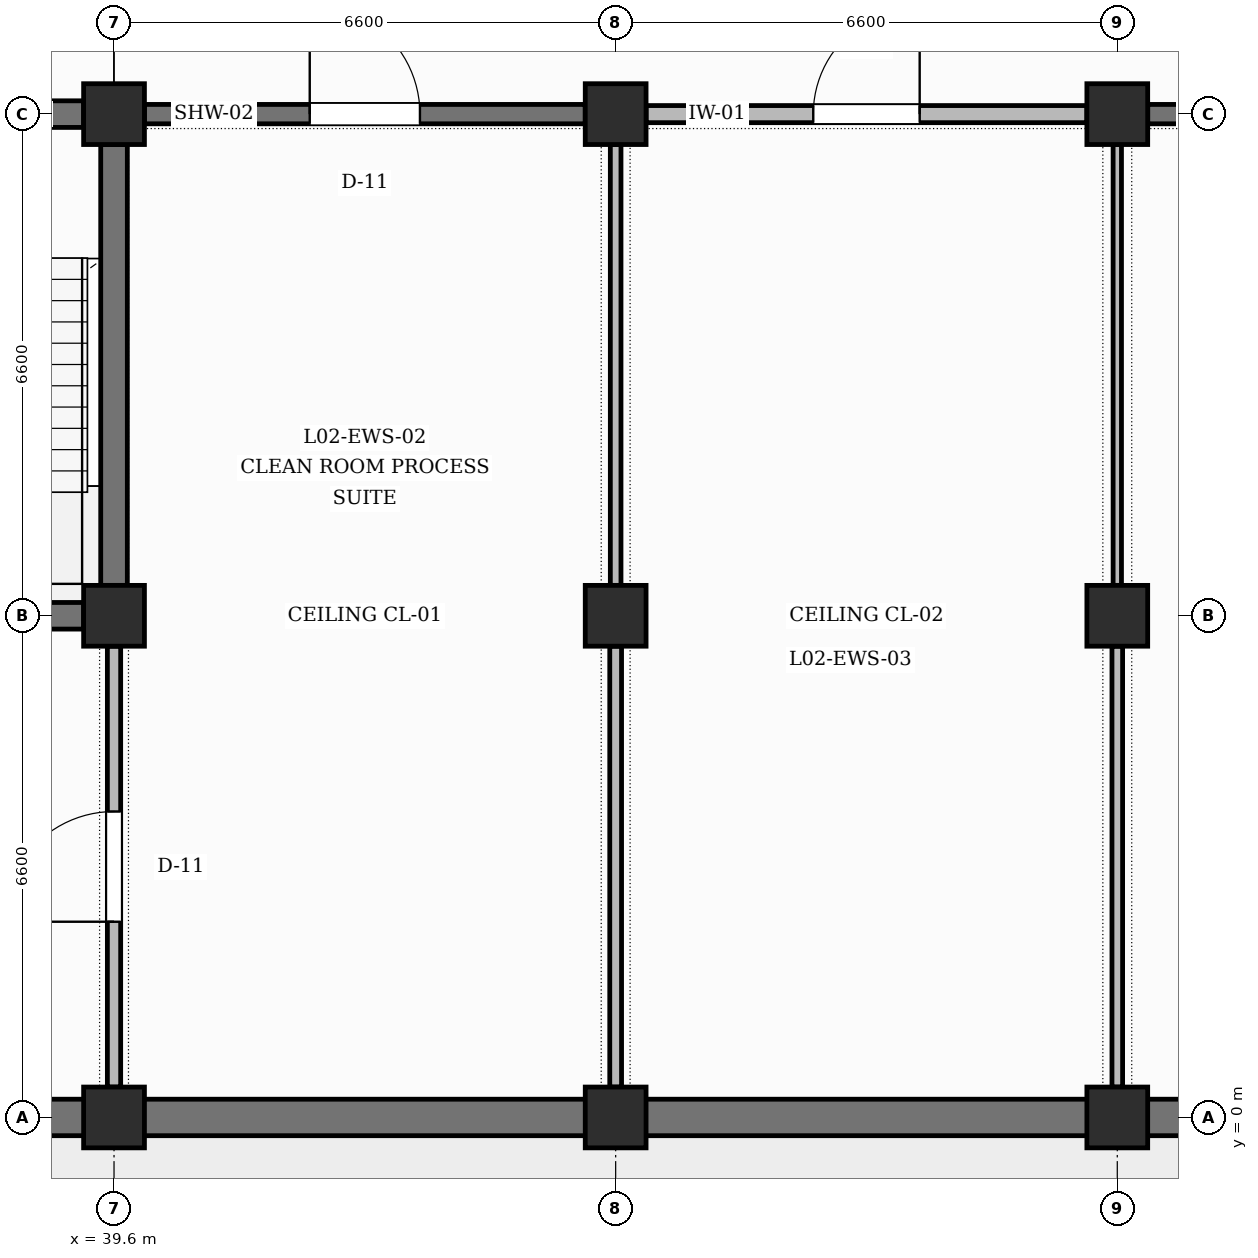
"""IFC4 building model, lengths in metres.
Left out: names, types, materials, properties, quantities, classifications, styles, units other than length and angle.
Written with IfcOpenShell. Run it as: python <this file> out.ifc"""

import sys

from ifc_helpers import new_model, si_unit, direction, frame, frame_2d, origin, origin_2d, place, context, subcontext, project, spatial, rectangle, extrude, element, fill, save


model = new_model("IFC4")
c1 = context("Model", 3, precision=1e-05, world=origin(), true_north=direction((0.0, 1.0)))
c2 = subcontext(c1, "Body", "Model", "MODEL_VIEW")
j1 = project(units=[si_unit("LENGTHUNIT", "METRE"), si_unit("PLANEANGLEUNIT", "RADIAN")], contexts=[c1])
p1 = place(None, origin())
s1 = spatial("IfcSite", under=j1, at=p1, CompositionType="ELEMENT")
p2 = place(p1, origin())
s2 = spatial("IfcBuilding", under=s1, at=p2, CompositionType="ELEMENT")
p3 = place(p2, frame((0.0, 0.0, 10.2)))
s3 = spatial("IfcBuildingStorey", under=s2, at=p3, CompositionType="ELEMENT", Elevation=10.2)
for number, where, z_axis, x_axis in (
    (1, (39.6, 0.0, 0.0), (0.0, 0.0, 1.0), (1.0, 0.0, 0.0)),
    (2, (39.6, 6.6, 0.0), (0.0, 0.0, 1.0), (1.0, 0.0, 0.0)),
    (3, (39.6, 13.2, 0.0), (0.0, 0.0, 1.0), (1.0, 0.0, 0.0)),
    (4, (46.2, 0.0, 0.0), (0.0, 0.0, 1.0), (1.0, 0.0, 0.0)),
    (5, (46.2, 6.6, 0.0), (0.0, 0.0, 1.0), (1.0, 0.0, 0.0)),
    (6, (46.2, 13.2, 0.0), (0.0, 0.0, 1.0), (1.0, 0.0, 0.0)),
    (7, (52.8, 0.0, 0.0), (0.0, 0.0, 1.0), (1.0, 0.0, 0.0)),
    (8, (52.8, 6.6, 0.0), (0.0, 0.0, 1.0), (1.0, 0.0, 0.0)),
    (9, (52.8, 13.2, 0.0), (0.0, 0.0, 1.0), (1.0, 0.0, 0.0)),
):
    element("IfcColumn", number, at=place(p3, frame(where, z_axis=z_axis, x_axis=x_axis)), inside=s3, PredefinedType="COLUMN", context=c2, shape_type="SweptSolid", body=[
        extrude(rectangle(XDim=0.8, YDim=0.8, at=origin_2d()), origin(), (0.0, 0.0, 1.0), 4.2),
    ])
p4 = place(p3, frame((33.425, 0.0, 0.0), z_axis=(0.0, 0.0, 1.0), x_axis=(1.0, 0.0, 0.0)))
e10 = element("IfcWall", 10, at=p4, inside=s3, PredefinedType="SOLIDWALL", context=c2, shape_type="SweptSolid", body=[
    extrude(rectangle(XDim=5.775, YDim=0.48, at=frame_2d((2.887, 0.0))), origin(), (0.0, 0.0, 1.0), 3.25),
])
p5 = place(p3, frame((40.0, 0.0, 0.0), z_axis=(0.0, 0.0, 1.0), x_axis=(1.0, 0.0, 0.0)))
e11 = element("IfcWall", 11, at=p5, inside=s3, PredefinedType="SOLIDWALL", context=c2, shape_type="SweptSolid", body=[
    extrude(rectangle(XDim=5.8, YDim=0.48, at=frame_2d((2.9, 0.0))), origin(), (0.0, 0.0, 1.0), 3.25),
])
p6 = place(p3, frame((46.6, 0.0, 0.0), z_axis=(0.0, 0.0, 1.0), x_axis=(1.0, 0.0, 0.0)))
e12 = element("IfcWall", 12, at=p6, inside=s3, PredefinedType="SOLIDWALL", context=c2, shape_type="SweptSolid", body=[
    extrude(rectangle(XDim=5.8, YDim=0.48, at=frame_2d((2.9, 0.0))), origin(), (0.0, 0.0, 1.0), 3.25),
])
p7 = place(p3, frame((53.2, 0.0, 0.0), z_axis=(0.0, 0.0, 1.0), x_axis=(1.0, 0.0, 0.0)))
e13 = element("IfcWall", 13, at=p7, inside=s3, PredefinedType="SOLIDWALL", context=c2, shape_type="SweptSolid", body=[
    extrude(rectangle(XDim=5.8, YDim=0.48, at=frame_2d((2.9, 0.0))), origin(), (0.0, 0.0, 1.0), 3.25),
])
p8 = place(p3, frame((33.425, 6.6, 0.0), z_axis=(0.0, 0.0, 1.0), x_axis=(1.0, 0.0, 0.0)))
e14 = element("IfcWall", 14, at=p8, inside=s3, PredefinedType="SHEAR", context=c2, shape_type="SweptSolid", body=[
    extrude(rectangle(XDim=5.775, YDim=0.35, at=frame_2d((2.887, 0.0))), origin(), (0.0, 0.0, 1.0), 3.0),
])
p9 = place(p3, frame((33.425, 13.2, 0.0), z_axis=(0.0, 0.0, 1.0), x_axis=(1.0, 0.0, 0.0)))
e15 = element("IfcWall", 15, at=p9, inside=s3, PredefinedType="SHEAR", context=c2, shape_type="SweptSolid", body=[
    extrude(rectangle(XDim=5.775, YDim=0.35, at=frame_2d((2.887, 0.0))), origin(), (0.0, 0.0, 1.0), 3.1),
])
p10 = place(p9, frame((2.312, 0.0, 0.0)))
e16 = element("IfcOpeningElement", 16, at=p10, cuts=e15, PredefinedType="OPENING", context=c2, shape_type="SweptSolid", body=[
    extrude(rectangle(XDim=1.15, YDim=2.2, at=frame_2d((0.575, 1.1))), frame((0.0, 0.185, 0.0), z_axis=(0.0, -1.0, 0.0), x_axis=(1.0, 0.0, 0.0)), (0.0, 0.0, 1.0), 0.37),
])
p11 = place(p3, frame((39.6, 7.0, 0.0), z_axis=(0.0, 0.0, 1.0), x_axis=(0.0, 1.0, 0.0)))
e17 = element("IfcWall", 17, at=p11, inside=s3, PredefinedType="SHEAR", context=c2, shape_type="SweptSolid", body=[
    extrude(rectangle(XDim=5.8, YDim=0.35, at=frame_2d((2.9, 0.0))), origin(), (0.0, 0.0, 1.0), 3.1),
])
p12 = place(p3, frame((39.6, 0.4, 0.0), z_axis=(0.0, 0.0, 1.0), x_axis=(0.0, 1.0, 0.0)))
e18 = element("IfcWall", 18, at=p12, inside=s3, PredefinedType="PARTITIONING", context=c2, shape_type="SweptSolid", body=[
    extrude(rectangle(XDim=5.8, YDim=0.175, at=frame_2d((2.9, 0.0))), origin(), (0.0, 0.0, 1.0), 3.1),
])
p13 = place(p12, frame((2.175, 0.0, 0.0)))
e19 = element("IfcOpeningElement", 19, at=p13, cuts=e18, PredefinedType="OPENING", context=c2, shape_type="SweptSolid", body=[
    extrude(rectangle(XDim=1.45, YDim=2.25, at=frame_2d((0.725, 1.125))), frame((0.0, 0.097, 0.0), z_axis=(0.0, -1.0, 0.0), x_axis=(1.0, 0.0, 0.0)), (0.0, 0.0, 1.0), 0.195),
])
p14 = place(p3, frame((46.2, 0.4, 0.0), z_axis=(0.0, 0.0, 1.0), x_axis=(0.0, 1.0, 0.0)))
e20 = element("IfcWall", 20, at=p14, inside=s3, PredefinedType="PARTITIONING", context=c2, shape_type="SweptSolid", body=[
    extrude(rectangle(XDim=5.8, YDim=0.155, at=frame_2d((2.9, 0.0))), origin(), (0.0, 0.0, 1.0), 3.1),
])
p15 = place(p3, frame((46.2, 7.0, 0.0), z_axis=(0.0, 0.0, 1.0), x_axis=(0.0, 1.0, 0.0)))
e21 = element("IfcWall", 21, at=p15, inside=s3, PredefinedType="PARTITIONING", context=c2, shape_type="SweptSolid", body=[
    extrude(rectangle(XDim=5.8, YDim=0.14, at=frame_2d((2.9, 0.0))), origin(), (0.0, 0.0, 1.0), 3.1),
])
p16 = place(p3, frame((40.0, 13.2, 0.0), z_axis=(0.0, 0.0, 1.0), x_axis=(1.0, 0.0, 0.0)))
e22 = element("IfcWall", 22, at=p16, inside=s3, PredefinedType="SHEAR", context=c2, shape_type="SweptSolid", body=[
    extrude(rectangle(XDim=5.8, YDim=0.255, at=frame_2d((2.9, 0.0))), origin(), (0.0, 0.0, 1.0), 3.0),
])
p17 = place(p16, frame((2.175, 0.0, 0.0)))
e23 = element("IfcOpeningElement", 23, at=p17, cuts=e22, PredefinedType="OPENING", context=c2, shape_type="SweptSolid", body=[
    extrude(rectangle(XDim=1.45, YDim=2.25, at=frame_2d((0.725, 1.125))), frame((0.0, 0.137, 0.0), z_axis=(0.0, -1.0, 0.0), x_axis=(1.0, 0.0, 0.0)), (0.0, 0.0, 1.0), 0.275),
])
p18 = place(p3, frame((52.8, 0.4, 0.0), z_axis=(0.0, 0.0, 1.0), x_axis=(0.0, 1.0, 0.0)))
e24 = element("IfcWall", 24, at=p18, inside=s3, PredefinedType="PARTITIONING", context=c2, shape_type="SweptSolid", body=[
    extrude(rectangle(XDim=5.8, YDim=0.14, at=frame_2d((2.9, 0.0))), origin(), (0.0, 0.0, 1.0), 3.1),
])
p19 = place(p3, frame((52.8, 7.0, 0.0), z_axis=(0.0, 0.0, 1.0), x_axis=(0.0, 1.0, 0.0)))
e25 = element("IfcWall", 25, at=p19, inside=s3, PredefinedType="PARTITIONING", context=c2, shape_type="SweptSolid", body=[
    extrude(rectangle(XDim=5.8, YDim=0.11, at=frame_2d((2.9, 0.0))), origin(), (0.0, 0.0, 1.0), 3.1),
])
p20 = place(p3, frame((46.6, 13.2, 0.0), z_axis=(0.0, 0.0, 1.0), x_axis=(1.0, 0.0, 0.0)))
e26 = element("IfcWall", 26, at=p20, inside=s3, PredefinedType="PARTITIONING", context=c2, shape_type="SweptSolid", body=[
    extrude(rectangle(XDim=5.8, YDim=0.225, at=frame_2d((2.9, 0.0))), origin(), (0.0, 0.0, 1.0), 3.1),
])
p21 = place(p20, frame((2.2, 0.0, 0.0)))
e27 = element("IfcOpeningElement", 27, at=p21, cuts=e26, PredefinedType="OPENING", context=c2, shape_type="SweptSolid", body=[
    extrude(rectangle(XDim=1.4, YDim=2.25, at=frame_2d((0.7, 1.125))), frame((0.0, 0.123, 0.0), z_axis=(0.0, -1.0, 0.0), x_axis=(1.0, 0.0, 0.0)), (0.0, 0.0, 1.0), 0.245),
])
p22 = place(p3, frame((53.2, 13.2, 0.0), z_axis=(0.0, 0.0, 1.0), x_axis=(1.0, 0.0, 0.0)))
e28 = element("IfcWall", 28, at=p22, inside=s3, PredefinedType="SHEAR", context=c2, shape_type="SweptSolid", body=[
    extrude(rectangle(XDim=5.8, YDim=0.255, at=frame_2d((2.9, 0.0))), origin(), (0.0, 0.0, 1.0), 3.0),
])
p23 = place(p22, frame((2.225, 0.0, 0.0)))
e29 = element("IfcOpeningElement", 29, at=p23, cuts=e28, PredefinedType="OPENING", context=c2, shape_type="SweptSolid", body=[
    extrude(rectangle(XDim=1.35, YDim=2.3, at=frame_2d((0.675, 1.15))), frame((0.0, 0.137, 0.0), z_axis=(0.0, -1.0, 0.0), x_axis=(1.0, 0.0, 0.0)), (0.0, 0.0, 1.0), 0.275),
])
p24 = place(p17, origin())
e30 = element("IfcDoor", 30, at=p24, inside=s3, OperationType="SINGLE_SWING_LEFT", PredefinedType="DOOR", context=c2, shape_type="SweptSolid", body=[
    extrude(rectangle(XDim=1.45, YDim=2.25, at=frame_2d((0.725, 1.125))), frame((0.0, 0.025, 0.0), z_axis=(0.0, -1.0, 0.0), x_axis=(1.0, 0.0, 0.0)), (0.0, 0.0, 1.0), 0.05),
])
fill(e23, e30)
p25 = place(p21, origin())
e31 = element("IfcDoor", 31, at=p25, inside=s3, OperationType="SINGLE_SWING_RIGHT", PredefinedType="DOOR", context=c2, shape_type="SweptSolid", body=[
    extrude(rectangle(XDim=1.4, YDim=2.25, at=frame_2d((0.7, 1.125))), frame((0.0, 0.025, 0.0), z_axis=(0.0, -1.0, 0.0), x_axis=(1.0, 0.0, 0.0)), (0.0, 0.0, 1.0), 0.05),
])
fill(e27, e31)
p26 = place(p13, origin())
e32 = element("IfcDoor", 32, at=p26, inside=s3, OperationType="SINGLE_SWING_LEFT", PredefinedType="DOOR", context=c2, shape_type="SweptSolid", body=[
    extrude(rectangle(XDim=1.45, YDim=2.25, at=frame_2d((0.725, 1.125))), frame((0.0, 0.025, 0.0), z_axis=(0.0, -1.0, 0.0), x_axis=(1.0, 0.0, 0.0)), (0.0, 0.0, 1.0), 0.05),
])
fill(e19, e32)
save(model, sys.argv[1])
